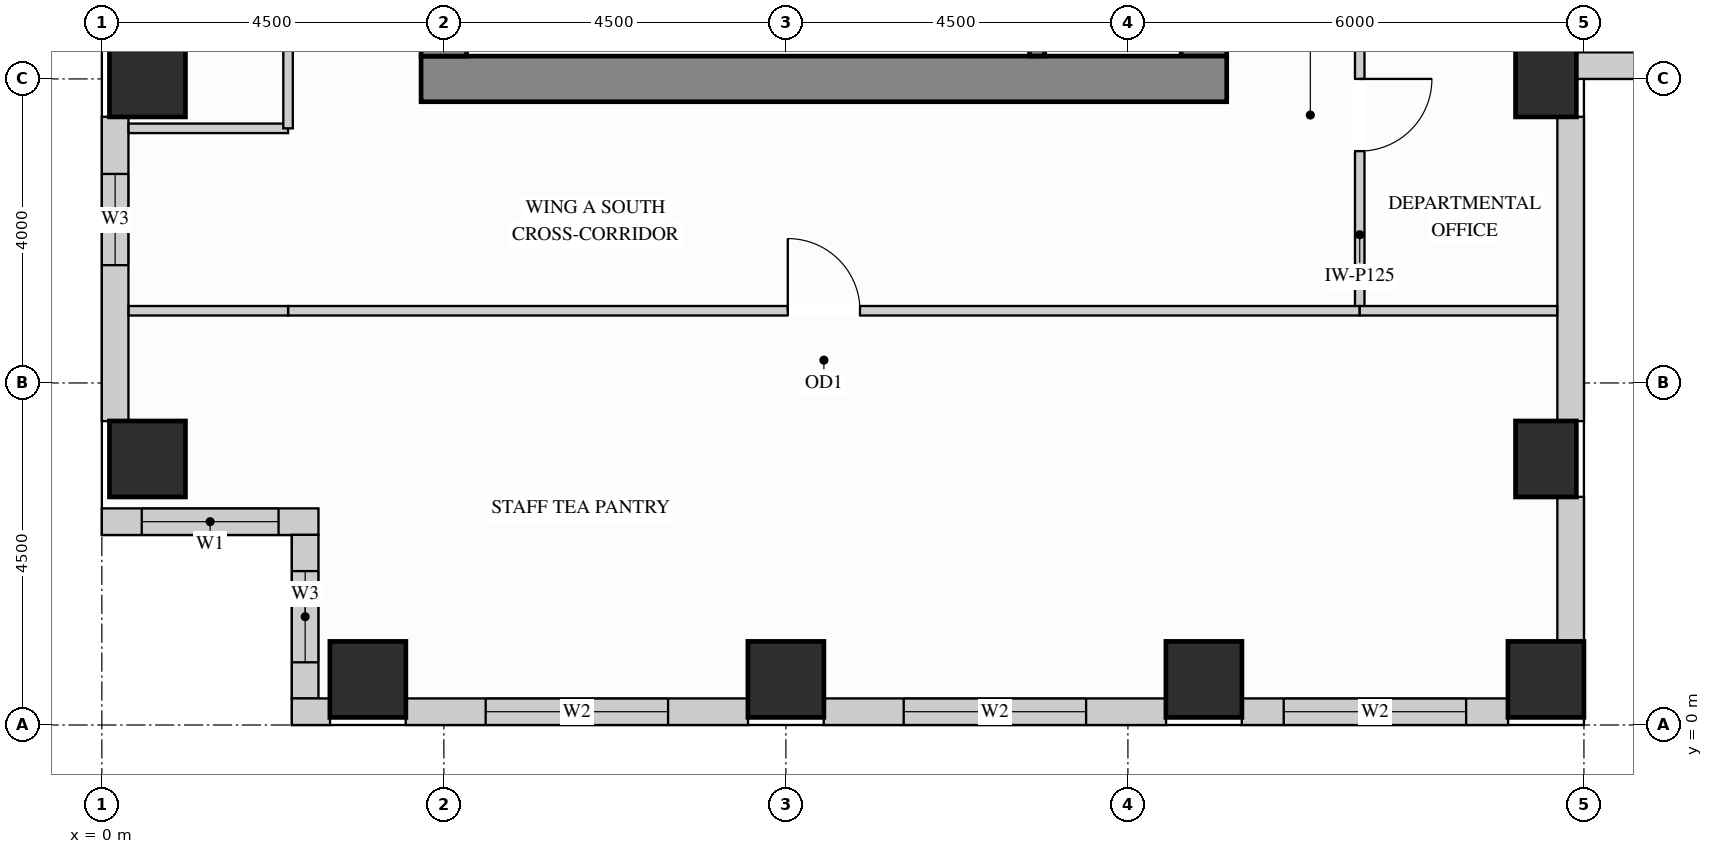
"""IFC4 building model, lengths in metres.
Left out: names, types, materials, properties, quantities, classifications, styles, units other than length and angle.
Written with IfcOpenShell. Run it as: python <this file> out.ifc"""

import sys

from ifc_helpers import new_model, si_unit, direction, frame, frame_2d, origin, origin_2d, place, context, subcontext, project, spatial, rectangle, extrude, source, transform, mapped, element, fill, save


model = new_model("IFC4")
c1 = context("Model", 3, precision=1e-05, world=origin(), true_north=direction((0.0, 1.0)))
c2 = subcontext(c1, "Body", "Model", "MODEL_VIEW")
j1 = project(units=[si_unit("LENGTHUNIT", "METRE"), si_unit("PLANEANGLEUNIT", "RADIAN")], contexts=[c1])
p1 = place(None, origin())
s1 = spatial("IfcSite", under=j1, at=p1, CompositionType="ELEMENT")
p2 = place(p1, origin())
s2 = spatial("IfcBuilding", under=s1, at=p2, CompositionType="ELEMENT")
p3 = place(p2, frame((0.0, 0.0, 197.1)))
s3 = spatial("IfcBuildingStorey", under=s2, at=p3, CompositionType="ELEMENT", Elevation=197.1)
m1 = source(origin(), c2, "Body", "SweptSolid", [
    extrude(rectangle(XDim=0.8, YDim=1.0, at=origin_2d()), origin(), (0.0, 0.0, 1.0), 3.4),
])
for number, where, z_axis, x_axis in (
    (1, (19.0, 3.5, 0.0), (0.0, 0.0, 1.0), (1.0, 0.0, 0.0)),
    (2, (19.0, 8.5, 0.0), (0.0, 0.0, 1.0), (1.0, 0.0, 0.0)),
):
    element("IfcColumn", number, at=place(p3, frame(where, z_axis=z_axis, x_axis=x_axis)), inside=s3, PredefinedType="COLUMN", context=c2, shape_type="MappedRepresentation", body=[
        mapped(m1, transform((0.0, 0.0, 0.0), x_axis=(1.0, 0.0, 0.0), y_axis=(0.0, 1.0, 0.0), z_axis=(0.0, 0.0, 1.0))),
    ])
m2 = source(origin(), c2, "Body", "SweptSolid", [
    extrude(rectangle(XDim=1.0, YDim=1.0, at=origin_2d()), origin(), (0.0, 0.0, 1.0), 3.4),
])
for number, where, z_axis, x_axis in (
    (3, (14.5, 0.6, 0.0), (0.0, 0.0, 1.0), (1.0, 0.0, 0.0)),
    (4, (19.0, 0.6, 0.0), (0.0, 0.0, 1.0), (1.0, 0.0, 0.0)),
    (5, (3.5, 0.6, 0.0), (0.0, 0.0, 1.0), (1.0, 0.0, 0.0)),
    (6, (9.0, 0.6, 0.0), (0.0, 0.0, 1.0), (1.0, 0.0, 0.0)),
    (7, (0.6, 3.5, 0.0), (0.0, 0.0, 1.0), (1.0, 0.0, 0.0)),
    (8, (0.6, 8.5, 0.0), (0.0, 0.0, 1.0), (1.0, 0.0, 0.0)),
):
    element("IfcColumn", number, at=place(p3, frame(where, z_axis=z_axis, x_axis=x_axis)), inside=s3, PredefinedType="COLUMN", context=c2, shape_type="MappedRepresentation", body=[
        mapped(m2, transform((0.0, 0.0, 0.0), x_axis=(1.0, 0.0, 0.0), y_axis=(0.0, 1.0, 0.0), z_axis=(0.0, 0.0, 1.0))),
    ])
m3 = source(origin(), c2, "Body", "SweptSolid", [
    extrude(rectangle(XDim=10.02, YDim=0.6, at=frame_2d((5.01, 0.0))), origin(), (0.0, 0.0, 1.0), 3.4),
])
p4 = place(p3, frame((14.5, 8.8, 0.0), z_axis=(0.0, 0.0, 1.0), x_axis=(0.0, 1.0, 0.0)))
e9 = element("IfcWall", 9, at=p4, inside=s3, PredefinedType="SHEAR", context=c2, shape_type="MappedRepresentation", body=[
    mapped(m3, transform((0.0, 0.0, 0.0), x_axis=(1.0, 0.0, 0.0), y_axis=(0.0, 1.0, 0.0), z_axis=(0.0, 0.0, 1.0))),
])
m4 = source(origin(), c2, "Body", "SweptSolid", [
    extrude(rectangle(XDim=10.6, YDim=0.6, at=frame_2d((5.3, 0.0))), origin(), (0.0, 0.0, 1.0), 3.4),
])
p5 = place(p3, frame((4.2, 8.5, 0.0), z_axis=(0.0, 0.0, 1.0), x_axis=(1.0, 0.0, 0.0)))
e10 = element("IfcWall", 10, at=p5, inside=s3, PredefinedType="SHEAR", context=c2, shape_type="MappedRepresentation", body=[
    mapped(m4, transform((0.0, 0.0, 0.0), x_axis=(1.0, 0.0, 0.0), y_axis=(0.0, 1.0, 0.0), z_axis=(0.0, 0.0, 1.0))),
])
m5 = source(origin(), c2, "Body", "SweptSolid", [
    extrude(rectangle(XDim=20.4, YDim=0.6, at=frame_2d((10.2, 0.0))), origin(), (0.0, 0.0, 1.0), 3.4),
])
p6 = place(p3, frame((4.5, 8.8, 0.0), z_axis=(0.0, 0.0, 1.0), x_axis=(0.0, 1.0, 0.0)))
e11 = element("IfcWall", 11, at=p6, inside=s3, PredefinedType="SHEAR", context=c2, shape_type="MappedRepresentation", body=[
    mapped(m5, transform((0.0, 0.0, 0.0), x_axis=(1.0, 0.0, 0.0), y_axis=(0.0, 1.0, 0.0), z_axis=(0.0, 0.0, 1.0))),
])
p7 = place(p3, frame((0.175, 8.002, 0.0), z_axis=(0.0, 0.0, 1.0), x_axis=(0.0, -1.0, 0.0)))
e12 = element("IfcWall", 12, at=p7, inside=s3, PredefinedType="SOLIDWALL", context=c2, shape_type="SweptSolid", body=[
    extrude(rectangle(XDim=4.004, YDim=0.35, at=frame_2d((2.002, 0.0))), origin(), (0.0, 0.0, 1.0), 2.612),
])
p8 = place(p7, frame((0.752, 0.0, 0.78)))
e13 = element("IfcOpeningElement", 13, at=p8, cuts=e12, PredefinedType="OPENING", context=c2, shape_type="SweptSolid", body=[
    extrude(rectangle(XDim=1.2, YDim=1.652, at=frame_2d((0.6, 0.826))), frame((0.0, 0.185, 0.0), z_axis=(0.0, -1.0, 0.0), x_axis=(1.0, 0.0, 0.0)), (0.0, 0.0, 1.0), 0.37),
])
p9 = place(p3, frame((0.0, 2.675, 0.0), z_axis=(0.0, 0.0, 1.0), x_axis=(1.0, 0.0, 0.0)))
e14 = element("IfcWall", 14, at=p9, inside=s3, PredefinedType="SOLIDWALL", context=c2, shape_type="SweptSolid", body=[
    extrude(rectangle(XDim=2.85, YDim=0.35, at=frame_2d((1.425, 0.0))), origin(), (0.0, 0.0, 1.0), 3.385),
])
p10 = place(p9, frame((0.525, 0.0, 0.78)))
e15 = element("IfcOpeningElement", 15, at=p10, cuts=e14, PredefinedType="OPENING", context=c2, shape_type="SweptSolid", body=[
    extrude(rectangle(XDim=1.8, YDim=2.1, at=frame_2d((0.9, 1.05))), frame((0.0, 0.185, 0.0), z_axis=(0.0, -1.0, 0.0), x_axis=(1.0, 0.0, 0.0)), (0.0, 0.0, 1.0), 0.37),
])
p11 = place(p3, frame((2.675, 2.502, 0.0), z_axis=(0.0, 0.0, 1.0), x_axis=(0.0, -1.0, 0.0)))
e16 = element("IfcWall", 16, at=p11, inside=s3, PredefinedType="SOLIDWALL", context=c2, shape_type="SweptSolid", body=[
    extrude(rectangle(XDim=2.154, YDim=0.35, at=frame_2d((1.077, 0.0))), origin(), (0.0, 0.0, 1.0), 3.385),
])
p12 = place(p11, frame((0.477, 0.0, 0.78)))
e17 = element("IfcOpeningElement", 17, at=p12, cuts=e16, PredefinedType="OPENING", context=c2, shape_type="SweptSolid", body=[
    extrude(rectangle(XDim=1.2, YDim=2.1, at=frame_2d((0.6, 1.05))), frame((0.0, 0.185, 0.0), z_axis=(0.0, -1.0, 0.0), x_axis=(1.0, 0.0, 0.0)), (0.0, 0.0, 1.0), 0.37),
])
m6 = source(origin(), c2, "Body", "SweptSolid", [
    extrude(rectangle(XDim=0.502, YDim=0.35, at=frame_2d((0.251, 0.0))), origin(), (0.0, 0.0, 1.0), 3.385),
])
p13 = place(p3, frame((2.5, 0.175, 0.0), z_axis=(0.0, 0.0, 1.0), x_axis=(1.0, 0.0, 0.0)))
e18 = element("IfcWall", 18, at=p13, inside=s3, PredefinedType="SOLIDWALL", context=c2, shape_type="MappedRepresentation", body=[
    mapped(m6, transform((0.0, 0.0, 0.0), x_axis=(1.0, 0.0, 0.0), y_axis=(0.0, 1.0, 0.0), z_axis=(0.0, 0.0, 1.0))),
])
p14 = place(p3, frame((3.998, 0.175, 0.0), z_axis=(0.0, 0.0, 1.0), x_axis=(1.0, 0.0, 0.0)))
e19 = element("IfcWall", 19, at=p14, inside=s3, PredefinedType="SOLIDWALL", context=c2, shape_type="SweptSolid", body=[
    extrude(rectangle(XDim=4.504, YDim=0.35, at=frame_2d((2.252, 0.0))), origin(), (0.0, 0.0, 1.0), 2.612),
])
p15 = place(p14, frame((1.052, 0.0, 0.78)))
e20 = element("IfcOpeningElement", 20, at=p15, cuts=e19, PredefinedType="OPENING", context=c2, shape_type="SweptSolid", body=[
    extrude(rectangle(XDim=2.4, YDim=1.652, at=frame_2d((1.2, 0.826))), frame((0.0, 0.185, 0.0), z_axis=(0.0, -1.0, 0.0), x_axis=(1.0, 0.0, 0.0)), (0.0, 0.0, 1.0), 0.37),
])
p16 = place(p3, frame((9.498, 0.175, 0.0), z_axis=(0.0, 0.0, 1.0), x_axis=(1.0, 0.0, 0.0)))
e21 = element("IfcWall", 21, at=p16, inside=s3, PredefinedType="SOLIDWALL", context=c2, shape_type="SweptSolid", body=[
    extrude(rectangle(XDim=4.504, YDim=0.35, at=frame_2d((2.252, 0.0))), origin(), (0.0, 0.0, 1.0), 2.612),
])
p17 = place(p16, frame((1.052, 0.0, 0.78)))
e22 = element("IfcOpeningElement", 22, at=p17, cuts=e21, PredefinedType="OPENING", context=c2, shape_type="SweptSolid", body=[
    extrude(rectangle(XDim=2.4, YDim=1.652, at=frame_2d((1.2, 0.826))), frame((0.0, 0.185, 0.0), z_axis=(0.0, -1.0, 0.0), x_axis=(1.0, 0.0, 0.0)), (0.0, 0.0, 1.0), 0.37),
])
p18 = place(p3, frame((14.998, 0.175, 0.0), z_axis=(0.0, 0.0, 1.0), x_axis=(1.0, 0.0, 0.0)))
e23 = element("IfcWall", 23, at=p18, inside=s3, PredefinedType="SOLIDWALL", context=c2, shape_type="SweptSolid", body=[
    extrude(rectangle(XDim=3.504, YDim=0.35, at=frame_2d((1.752, 0.0))), origin(), (0.0, 0.0, 1.0), 2.612),
])
p19 = place(p18, frame((0.552, 0.0, 0.78)))
e24 = element("IfcOpeningElement", 24, at=p19, cuts=e23, PredefinedType="OPENING", context=c2, shape_type="SweptSolid", body=[
    extrude(rectangle(XDim=2.4, YDim=1.652, at=frame_2d((1.2, 0.826))), frame((0.0, 0.185, 0.0), z_axis=(0.0, -1.0, 0.0), x_axis=(1.0, 0.0, 0.0)), (0.0, 0.0, 1.0), 0.37),
])
m7 = source(origin(), c2, "Body", "SweptSolid", [
    extrude(rectangle(XDim=1.904, YDim=0.35, at=frame_2d((0.952, 0.0))), origin(), (0.0, 0.0, 1.0), 2.612),
])
p20 = place(p3, frame((19.325, 1.098, 0.0), z_axis=(0.0, 0.0, 1.0), x_axis=(0.0, 1.0, 0.0)))
e25 = element("IfcWall", 25, at=p20, inside=s3, PredefinedType="SOLIDWALL", context=c2, shape_type="MappedRepresentation", body=[
    mapped(m7, transform((0.0, 0.0, 0.0), x_axis=(1.0, 0.0, 0.0), y_axis=(0.0, 1.0, 0.0), z_axis=(0.0, 0.0, 1.0))),
])
m8 = source(origin(), c2, "Body", "SweptSolid", [
    extrude(rectangle(XDim=4.004, YDim=0.35, at=frame_2d((2.002, 0.0))), origin(), (0.0, 0.0, 1.0), 2.612),
])
p21 = place(p3, frame((19.325, 3.998, 0.0), z_axis=(0.0, 0.0, 1.0), x_axis=(0.0, 1.0, 0.0)))
e26 = element("IfcWall", 26, at=p21, inside=s3, PredefinedType="SOLIDWALL", context=c2, shape_type="MappedRepresentation", body=[
    mapped(m8, transform((0.0, 0.0, 0.0), x_axis=(1.0, 0.0, 0.0), y_axis=(0.0, 1.0, 0.0), z_axis=(0.0, 0.0, 1.0))),
])
p22 = place(p3, frame((19.398, 8.675, 0.0), z_axis=(0.0, 0.0, 1.0), x_axis=(1.0, 0.0, 0.0)))
e27 = element("IfcWall", 27, at=p22, inside=s3, PredefinedType="SOLIDWALL", context=c2, shape_type="SweptSolid", body=[
    extrude(rectangle(XDim=3.604, YDim=0.35, at=frame_2d((1.802, 0.0))), origin(), (0.0, 0.0, 1.0), 3.385),
])
p23 = place(p22, frame((1.067, 0.0, 0.78)))
e28 = element("IfcOpeningElement", 28, at=p23, cuts=e27, PredefinedType="OPENING", context=c2, shape_type="SweptSolid", body=[
    extrude(rectangle(XDim=1.5, YDim=2.0, at=frame_2d((0.75, 1.0))), frame((0.0, 0.185, 0.0), z_axis=(0.0, -1.0, 0.0), x_axis=(1.0, 0.0, 0.0)), (0.0, 0.0, 1.0), 0.37),
])
p24 = place(p3, frame((16.55, 5.45, 0.0), z_axis=(0.0, 0.0, 1.0), x_axis=(0.0, 1.0, 0.0)))
e29 = element("IfcWall", 29, at=p24, inside=s3, PredefinedType="PARTITIONING", context=c2, shape_type="SweptSolid", body=[
    extrude(rectangle(XDim=5.15, YDim=0.125, at=frame_2d((2.575, 0.0))), origin(), (0.0, 0.0, 1.0), 3.385),
])
p25 = place(p24, frame((2.1, 0.0, 0.0)))
e30 = element("IfcOpeningElement", 30, at=p25, cuts=e29, PredefinedType="OPENING", context=c2, shape_type="SweptSolid", body=[
    extrude(rectangle(XDim=0.95, YDim=2.15, at=frame_2d((0.475, 1.075))), frame((0.0, 0.073, 0.0), z_axis=(0.0, -1.0, 0.0), x_axis=(1.0, 0.0, 0.0)), (0.0, 0.0, 1.0), 0.145),
])
m9 = source(origin(), c2, "Body", "SweptSolid", [
    extrude(rectangle(XDim=2.098, YDim=0.125, at=frame_2d((1.049, 0.0))), origin(), (0.0, 0.0, 1.0), 3.385),
])
p26 = place(p3, frame((0.352, 7.85, 0.0), z_axis=(0.0, 0.0, 1.0), x_axis=(1.0, 0.0, 0.0)))
e31 = element("IfcWall", 31, at=p26, inside=s3, PredefinedType="PARTITIONING", context=c2, shape_type="MappedRepresentation", body=[
    mapped(m9, transform((0.0, 0.0, 0.0), x_axis=(1.0, 0.0, 0.0), y_axis=(0.0, 1.0, 0.0), z_axis=(0.0, 0.0, 1.0))),
])
p27 = place(p3, frame((2.45, 5.45, 0.0), z_axis=(0.0, 0.0, 1.0), x_axis=(1.0, 0.0, 0.0)))
e32 = element("IfcWall", 32, at=p27, inside=s3, PredefinedType="PARTITIONING", context=c2, shape_type="SweptSolid", body=[
    extrude(rectangle(XDim=14.1, YDim=0.125, at=frame_2d((7.05, 0.0))), origin(), (0.0, 0.0, 1.0), 3.385),
])
p28 = place(p27, frame((6.575, 0.0, 0.0)))
e33 = element("IfcOpeningElement", 33, at=p28, cuts=e32, PredefinedType="OPENING", context=c2, shape_type="SweptSolid", body=[
    extrude(rectangle(XDim=0.95, YDim=2.15, at=frame_2d((0.475, 1.075))), frame((0.0, 0.073, 0.0), z_axis=(0.0, -1.0, 0.0), x_axis=(1.0, 0.0, 0.0)), (0.0, 0.0, 1.0), 0.145),
])
p29 = place(p3, frame((0.352, 5.45, 0.0), z_axis=(0.0, 0.0, 1.0), x_axis=(1.0, 0.0, 0.0)))
e34 = element("IfcWall", 34, at=p29, inside=s3, PredefinedType="PARTITIONING", context=c2, shape_type="MappedRepresentation", body=[
    mapped(m9, transform((0.0, 0.0, 0.0), x_axis=(1.0, 0.0, 0.0), y_axis=(0.0, 1.0, 0.0), z_axis=(0.0, 0.0, 1.0))),
])
m10 = source(origin(), c2, "Body", "SweptSolid", [
    extrude(rectangle(XDim=2.598, YDim=0.125, at=frame_2d((1.299, 0.0))), origin(), (0.0, 0.0, 1.0), 3.385),
])
p30 = place(p3, frame((16.55, 5.45, 0.0), z_axis=(0.0, 0.0, 1.0), x_axis=(1.0, 0.0, 0.0)))
e35 = element("IfcWall", 35, at=p30, inside=s3, PredefinedType="PARTITIONING", context=c2, shape_type="MappedRepresentation", body=[
    mapped(m10, transform((0.0, 0.0, 0.0), x_axis=(1.0, 0.0, 0.0), y_axis=(0.0, 1.0, 0.0), z_axis=(0.0, 0.0, 1.0))),
])
p31 = place(p3, frame((2.45, 7.85, 0.0), z_axis=(0.0, 0.0, 1.0), x_axis=(0.0, 1.0, 0.0)))
e36 = element("IfcWall", 36, at=p31, inside=s3, PredefinedType="PARTITIONING", context=c2, shape_type="SweptSolid", body=[
    extrude(rectangle(XDim=7.25, YDim=0.125, at=frame_2d((3.625, 0.0))), origin(), (0.0, 0.0, 1.0), 3.385),
])
p32 = place(p31, frame((3.15, 0.0, 0.0)))
e37 = element("IfcOpeningElement", 37, at=p32, cuts=e36, PredefinedType="OPENING", context=c2, shape_type="SweptSolid", body=[
    extrude(rectangle(XDim=0.95, YDim=2.15, at=frame_2d((0.475, 1.075))), frame((0.0, 0.073, 0.0), z_axis=(0.0, -1.0, 0.0), x_axis=(1.0, 0.0, 0.0)), (0.0, 0.0, 1.0), 0.145),
])
m11 = source(origin(), c2, "Body", "SweptSolid", [
    extrude(rectangle(XDim=3.753, YDim=0.2, at=frame_2d((1.876, 0.0))), origin(), (0.0, 0.0, 1.0), 3.4),
])
p33 = place(p3, frame((12.305, 8.802, 0.0), z_axis=(0.0, 0.0, 1.0), x_axis=(0.0, 1.0, 0.0)))
e38 = element("IfcWall", 38, at=p33, inside=s3, PredefinedType="SHEAR", context=c2, shape_type="MappedRepresentation", body=[
    mapped(m11, transform((0.0, 0.0, 0.0), x_axis=(1.0, 0.0, 0.0), y_axis=(0.0, 1.0, 0.0), z_axis=(0.0, 0.0, 1.0))),
])
m12 = source(origin(), c2, "Body", "SweptSolid", [
    extrude(rectangle(XDim=0.95, YDim=2.15, at=frame_2d((0.475, 1.075))), frame((0.0, 0.025, 0.0), z_axis=(0.0, -1.0, 0.0), x_axis=(1.0, 0.0, 0.0)), (0.0, 0.0, 1.0), 0.05),
])
p34 = place(p25, origin())
e39 = element("IfcDoor", 39, at=p34, inside=s3, OperationType="SINGLE_SWING_RIGHT", PredefinedType="DOOR", context=c2, shape_type="MappedRepresentation", body=[
    mapped(m12, transform((0.0, 0.0, 0.0), x_axis=(1.0, 0.0, 0.0), y_axis=(0.0, 1.0, 0.0), z_axis=(0.0, 0.0, 1.0))),
])
fill(e30, e39)
p35 = place(p28, origin())
e40 = element("IfcDoor", 40, at=p35, inside=s3, OperationType="SINGLE_SWING_LEFT", PredefinedType="DOOR", context=c2, shape_type="MappedRepresentation", body=[
    mapped(m12, transform((0.0, 0.0, 0.0), x_axis=(1.0, 0.0, 0.0), y_axis=(0.0, 1.0, 0.0), z_axis=(0.0, 0.0, 1.0))),
])
fill(e33, e40)
m13 = source(origin(), c2, "Body", "SweptSolid", [
    extrude(rectangle(XDim=1.8, YDim=2.1, at=frame_2d((0.9, 1.05))), frame((0.0, 0.03, 0.0), z_axis=(0.0, -1.0, 0.0), x_axis=(1.0, 0.0, 0.0)), (0.0, 0.0, 1.0), 0.06),
])
p36 = place(p10, origin())
e41 = element("IfcWindow", 41, at=p36, inside=s3, PartitioningType="SINGLE_PANEL", PredefinedType="WINDOW", context=c2, shape_type="MappedRepresentation", body=[
    mapped(m13, transform((0.0, 0.0, 0.0), x_axis=(1.0, 0.0, 0.0), y_axis=(0.0, 1.0, 0.0), z_axis=(0.0, 0.0, 1.0))),
])
fill(e15, e41)
m14 = source(origin(), c2, "Body", "SweptSolid", [
    extrude(rectangle(XDim=2.4, YDim=1.652, at=frame_2d((1.2, 0.826))), frame((0.0, 0.03, 0.0), z_axis=(0.0, -1.0, 0.0), x_axis=(1.0, 0.0, 0.0)), (0.0, 0.0, 1.0), 0.06),
])
p37 = place(p15, origin())
e42 = element("IfcWindow", 42, at=p37, inside=s3, PartitioningType="SINGLE_PANEL", PredefinedType="WINDOW", context=c2, shape_type="MappedRepresentation", body=[
    mapped(m14, transform((0.0, 0.0, 0.0), x_axis=(1.0, 0.0, 0.0), y_axis=(0.0, 1.0, 0.0), z_axis=(0.0, 0.0, 1.0))),
])
fill(e20, e42)
p38 = place(p17, origin())
e43 = element("IfcWindow", 43, at=p38, inside=s3, PartitioningType="SINGLE_PANEL", PredefinedType="WINDOW", context=c2, shape_type="MappedRepresentation", body=[
    mapped(m14, transform((0.0, 0.0, 0.0), x_axis=(1.0, 0.0, 0.0), y_axis=(0.0, 1.0, 0.0), z_axis=(0.0, 0.0, 1.0))),
])
fill(e22, e43)
p39 = place(p19, origin())
e44 = element("IfcWindow", 44, at=p39, inside=s3, PartitioningType="SINGLE_PANEL", PredefinedType="WINDOW", context=c2, shape_type="MappedRepresentation", body=[
    mapped(m14, transform((0.0, 0.0, 0.0), x_axis=(1.0, 0.0, 0.0), y_axis=(0.0, 1.0, 0.0), z_axis=(0.0, 0.0, 1.0))),
])
fill(e24, e44)
m15 = source(origin(), c2, "Body", "SweptSolid", [
    extrude(rectangle(XDim=1.2, YDim=1.652, at=frame_2d((0.6, 0.826))), frame((0.0, 0.03, 0.0), z_axis=(0.0, -1.0, 0.0), x_axis=(1.0, 0.0, 0.0)), (0.0, 0.0, 1.0), 0.06),
])
p40 = place(p8, origin())
e45 = element("IfcWindow", 45, at=p40, inside=s3, PartitioningType="SINGLE_PANEL", PredefinedType="WINDOW", context=c2, shape_type="MappedRepresentation", body=[
    mapped(m15, transform((0.0, 0.0, 0.0), x_axis=(1.0, 0.0, 0.0), y_axis=(0.0, 1.0, 0.0), z_axis=(0.0, 0.0, 1.0))),
])
fill(e13, e45)
m16 = source(origin(), c2, "Body", "SweptSolid", [
    extrude(rectangle(XDim=1.2, YDim=2.1, at=frame_2d((0.6, 1.05))), frame((0.0, 0.03, 0.0), z_axis=(0.0, -1.0, 0.0), x_axis=(1.0, 0.0, 0.0)), (0.0, 0.0, 1.0), 0.06),
])
p41 = place(p12, origin())
e46 = element("IfcWindow", 46, at=p41, inside=s3, PartitioningType="SINGLE_PANEL", PredefinedType="WINDOW", context=c2, shape_type="MappedRepresentation", body=[
    mapped(m16, transform((0.0, 0.0, 0.0), x_axis=(1.0, 0.0, 0.0), y_axis=(0.0, 1.0, 0.0), z_axis=(0.0, 0.0, 1.0))),
])
fill(e17, e46)
save(model, sys.argv[1])
